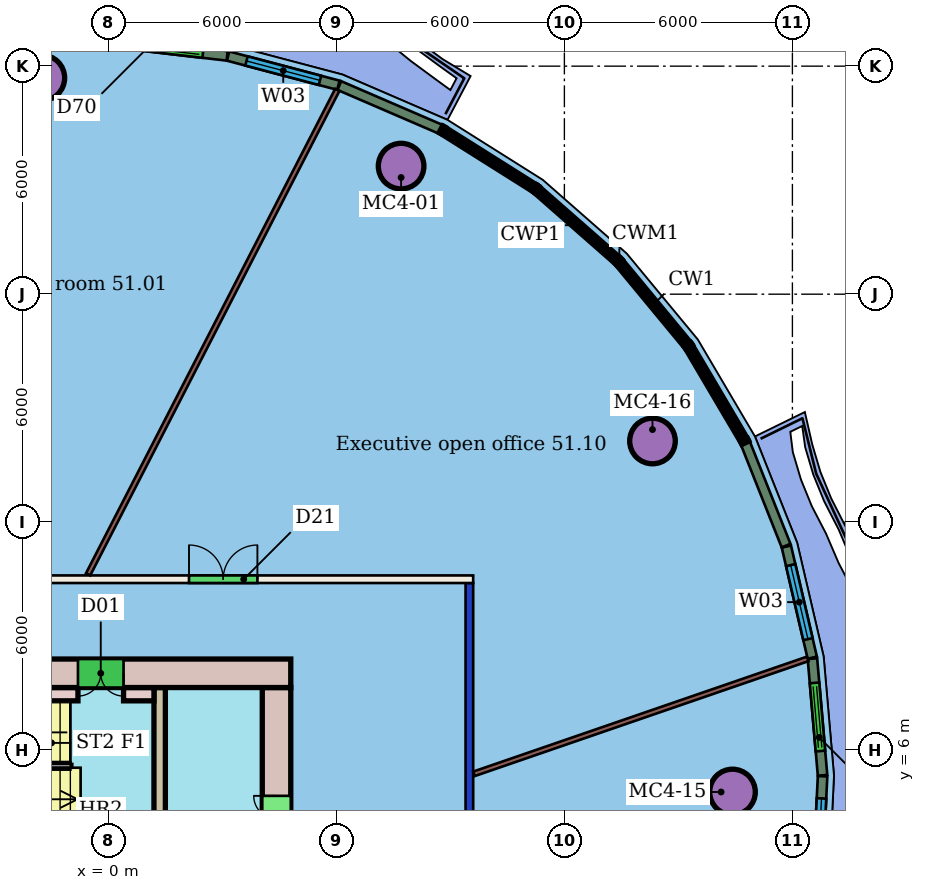
"""IFC4 building model, lengths in metres.
Left out: names, types, materials, properties, quantities, classifications, styles, units other than length and angle.
Written with IfcOpenShell. Run it as: python <this file> out.ifc"""

import sys

from ifc_helpers import new_model, si_unit, direction, frame, frame_2d, origin, origin_2d, place, context, subcontext, project, spatial, rectangle, hollow_circle, extrude, element, fill, save


model = new_model("IFC4")
c1 = context("Model", 3, precision=1e-05, world=origin(), true_north=direction((0.0, 1.0)))
c2 = subcontext(c1, "Body", "Model", "MODEL_VIEW")
j1 = project(units=[si_unit("LENGTHUNIT", "METRE"), si_unit("PLANEANGLEUNIT", "RADIAN")], contexts=[c1])
p1 = place(None, origin())
s1 = spatial("IfcSite", under=j1, at=p1, CompositionType="ELEMENT")
p2 = place(p1, origin())
s2 = spatial("IfcBuilding", under=s1, at=p2, CompositionType="ELEMENT")
p3 = place(p2, frame((0.0, 0.0, 210.1)))
s3 = spatial("IfcBuildingStorey", under=s2, at=p3, CompositionType="ELEMENT", Elevation=210.1)
for number, where, z_axis, x_axis in (
    (1, (7.704, 21.37, 0.0), (0.0, 0.0, 1.0), (1.0, 0.0, 0.0)),
    (2, (-1.75, 23.691, 0.0), (0.0, 0.0, 1.0), (1.0, 0.0, 0.0)),
    (3, (16.424, 4.901, 0.0), (0.0, 0.0, 1.0), (1.0, 0.0, 0.0)),
    (4, (14.318, 14.137, 0.0), (0.0, 0.0, 1.0), (1.0, 0.0, 0.0)),
):
    element("IfcColumn", number, at=place(p3, frame(where, z_axis=z_axis, x_axis=x_axis)), inside=s3, PredefinedType="COLUMN", context=c2, shape_type="SweptSolid", body=[
        extrude(hollow_circle(Radius=0.6, WallThickness=0.045, at=origin_2d()), origin(), (0.0, 0.0, 1.0), 3.45),
    ])
p4 = place(p3, frame((-21.6, 10.5, 0.0), z_axis=(0.0, 0.0, 1.0), x_axis=(1.0, 0.0, 0.0)))
e5 = element("IfcWall", 5, at=p4, inside=s3, PredefinedType="PARTITIONING", context=c2, shape_type="SweptSolid", body=[
    extrude(rectangle(XDim=31.2, YDim=0.2, at=frame_2d((15.6, 0.0))), origin(), (0.0, 0.0, 1.0), 3.45),
])
p5 = place(p4, frame((18.505, 0.0, 0.0)))
e6 = element("IfcOpeningElement", 6, at=p5, cuts=e5, PredefinedType="OPENING", context=c2, shape_type="SweptSolid", body=[
    extrude(rectangle(XDim=1.0, YDim=2.4, at=frame_2d((0.5, 1.2))), frame((0.0, 0.11, 0.0), z_axis=(0.0, -1.0, 0.0), x_axis=(1.0, 0.0, 0.0)), (0.0, 0.0, 1.0), 0.22),
])
p6 = place(p4, frame((11.808, 0.0, 0.0)))
e7 = element("IfcOpeningElement", 7, at=p6, cuts=e5, PredefinedType="OPENING", context=c2, shape_type="SweptSolid", body=[
    extrude(rectangle(XDim=1.0, YDim=2.4, at=frame_2d((0.5, 1.2))), frame((0.0, 0.11, 0.0), z_axis=(0.0, -1.0, 0.0), x_axis=(1.0, 0.0, 0.0)), (0.0, 0.0, 1.0), 0.22),
])
p7 = place(p4, frame((5.885, 0.0, 0.0)))
e8 = element("IfcOpeningElement", 8, at=p7, cuts=e5, PredefinedType="OPENING", context=c2, shape_type="SweptSolid", body=[
    extrude(rectangle(XDim=1.8, YDim=2.4, at=frame_2d((0.9, 1.2))), frame((0.0, 0.11, 0.0), z_axis=(0.0, -1.0, 0.0), x_axis=(1.0, 0.0, 0.0)), (0.0, 0.0, 1.0), 0.22),
])
p8 = place(p4, frame((23.722, 0.0, 0.0)))
e9 = element("IfcOpeningElement", 9, at=p8, cuts=e5, PredefinedType="OPENING", context=c2, shape_type="SweptSolid", body=[
    extrude(rectangle(XDim=1.8, YDim=2.1, at=frame_2d((0.9, 1.05))), frame((0.0, 0.11, 0.0), z_axis=(0.0, -1.0, 0.0), x_axis=(1.0, 0.0, 0.0)), (0.0, 0.0, 1.0), 0.22),
])
p9 = place(p3, frame((9.5, 10.4, 0.0), z_axis=(0.0, 0.0, 1.0), x_axis=(0.0, -1.0, 0.0)))
e10 = element("IfcWall", 10, at=p9, inside=s3, PredefinedType="PARTITIONING", context=c2, shape_type="SweptSolid", body=[
    extrude(rectangle(XDim=20.8, YDim=0.2, at=frame_2d((10.4, 0.0))), origin(), (0.0, 0.0, 1.0), 3.05),
])
p10 = place(p9, frame((11.307, 0.0, 0.0)))
e11 = element("IfcOpeningElement", 11, at=p10, cuts=e10, PredefinedType="OPENING", context=c2, shape_type="SweptSolid", body=[
    extrude(rectangle(XDim=1.5, YDim=2.1, at=frame_2d((0.75, 1.05))), frame((0.0, 0.11, 0.0), z_axis=(0.0, -1.0, 0.0), x_axis=(1.0, 0.0, 0.0)), (0.0, 0.0, 1.0), 0.22),
])
p11 = place(p3, frame((6.025, 23.377, 0.0), z_axis=(0.0, 0.0, 1.0), x_axis=(-0.457443054826, -0.889238917047, 0.0)))
e12 = element("IfcWall", 12, at=p11, inside=s3, PredefinedType="PARTITIONING", context=c2, shape_type="SweptSolid", body=[
    extrude(rectangle(XDim=14.336, YDim=0.125, at=frame_2d((7.168, 0.0))), origin(), (0.0, 0.0, 1.0), 3.45),
])
p12 = place(p3, frame((18.402, 8.403, 0.0), z_axis=(0.0, 0.0, 1.0), x_axis=(-0.945508934878, -0.325596151798, 0.0)))
e13 = element("IfcWall", 13, at=p12, inside=s3, PredefinedType="PARTITIONING", context=c2, shape_type="SweptSolid", body=[
    extrude(rectangle(XDim=9.288, YDim=0.125, at=frame_2d((4.644, 0.0))), origin(), (0.0, 0.0, 1.0), 3.45),
])
p13 = place(p3, frame((8.735, 22.343, 0.0), z_axis=(0.0, 0.0, 1.0), x_axis=(-0.918186540839, 0.396148300794, 0.0)))
e14 = element("IfcWall", 14, at=p13, inside=s3, PredefinedType="SOLIDWALL", context=c2, shape_type="SweptSolid", body=[
    extrude(rectangle(XDim=2.894, YDim=0.25, at=frame_2d((1.447, 0.0))), origin(), (0.0, 0.0, 1.0), 3.1),
])
p14 = place(p3, frame((6.053, 23.498, 0.0), z_axis=(0.0, 0.0, 1.0), x_axis=(-0.966837064295, 0.255393991914, 0.0)))
e15 = element("IfcWall", 15, at=p14, inside=s3, PredefinedType="SOLIDWALL", context=c2, shape_type="SweptSolid", body=[
    extrude(rectangle(XDim=3.002, YDim=0.25, at=frame_2d((1.501, 0.0))), origin(), (0.0, 0.0, 1.0), 3.1),
])
p15 = place(p14, frame((0.501, 0.0, 0.9)))
e16 = element("IfcOpeningElement", 16, at=p15, cuts=e15, PredefinedType="OPENING", context=c2, shape_type="SweptSolid", body=[
    extrude(rectangle(XDim=2.0, YDim=2.1, at=frame_2d((1.0, 1.05))), frame((0.0, 0.135, 0.0), z_axis=(0.0, -1.0, 0.0), x_axis=(1.0, 0.0, 0.0)), (0.0, 0.0, 1.0), 0.27),
])
p16 = place(p3, frame((3.125, 24.27, 0.0), z_axis=(0.0, 0.0, 1.0), x_axis=(-0.993285162652, 0.115691770042, 0.0)))
e17 = element("IfcWall", 17, at=p16, inside=s3, PredefinedType="SOLIDWALL", context=c2, shape_type="SweptSolid", body=[
    extrude(rectangle(XDim=3.081, YDim=0.25, at=frame_2d((1.541, 0.0))), origin(), (0.0, 0.0, 1.0), 3.1),
])
p17 = place(p16, frame((0.641, 0.0, 0.0)))
e18 = element("IfcOpeningElement", 18, at=p17, cuts=e17, PredefinedType="OPENING", context=c2, shape_type="SweptSolid", body=[
    extrude(rectangle(XDim=1.8, YDim=2.4, at=frame_2d((0.9, 1.2))), frame((0.0, 0.135, 0.0), z_axis=(0.0, -1.0, 0.0), x_axis=(1.0, 0.0, 0.0)), (0.0, 0.0, 1.0), 0.27),
])
p18 = place(p3, frame((18.64, 2.152, 0.0), z_axis=(0.0, 0.0, 1.0), x_axis=(0.048561254051, 0.998820206346, 0.0)))
e19 = element("IfcWall", 19, at=p18, inside=s3, PredefinedType="SOLIDWALL", context=c2, shape_type="SweptSolid", body=[
    extrude(rectangle(XDim=3.167, YDim=0.25, at=frame_2d((1.583, 0.0))), origin(), (0.0, 0.0, 1.0), 3.1),
])
p19 = place(p18, frame((0.584, 0.0, 0.9)))
e20 = element("IfcOpeningElement", 20, at=p19, cuts=e19, PredefinedType="OPENING", context=c2, shape_type="SweptSolid", body=[
    extrude(rectangle(XDim=2.0, YDim=2.1, at=frame_2d((1.0, 1.05))), frame((0.0, 0.135, 0.0), z_axis=(0.0, -1.0, 0.0), x_axis=(1.0, 0.0, 0.0)), (0.0, 0.0, 1.0), 0.27),
])
p20 = place(p3, frame((18.793, 5.341, 0.0), z_axis=(0.0, 0.0, 1.0), x_axis=(-0.086527038648, 0.996249502676, 0.0)))
e21 = element("IfcWall", 21, at=p20, inside=s3, PredefinedType="SOLIDWALL", context=c2, shape_type="SweptSolid", body=[
    extrude(rectangle(XDim=3.081, YDim=0.25, at=frame_2d((1.541, 0.0))), origin(), (0.0, 0.0, 1.0), 3.1),
])
p21 = place(p20, frame((0.641, 0.0, 0.0)))
e22 = element("IfcOpeningElement", 22, at=p21, cuts=e21, PredefinedType="OPENING", context=c2, shape_type="SweptSolid", body=[
    extrude(rectangle(XDim=1.8, YDim=2.4, at=frame_2d((0.9, 1.2))), frame((0.0, 0.135, 0.0), z_axis=(0.0, -1.0, 0.0), x_axis=(1.0, 0.0, 0.0)), (0.0, 0.0, 1.0), 0.27),
])
p22 = place(p3, frame((18.523, 8.436, 0.0), z_axis=(0.0, 0.0, 1.0), x_axis=(-0.226926203239, 0.973911956125, 0.0)))
e23 = element("IfcWall", 23, at=p22, inside=s3, PredefinedType="SOLIDWALL", context=c2, shape_type="SweptSolid", body=[
    extrude(rectangle(XDim=3.002, YDim=0.25, at=frame_2d((1.501, 0.0))), origin(), (0.0, 0.0, 1.0), 3.1),
])
p23 = place(p22, frame((0.501, 0.0, 0.9)))
e24 = element("IfcOpeningElement", 24, at=p23, cuts=e23, PredefinedType="OPENING", context=c2, shape_type="SweptSolid", body=[
    extrude(rectangle(XDim=2.0, YDim=2.1, at=frame_2d((1.0, 1.05))), frame((0.0, 0.135, 0.0), z_axis=(0.0, -1.0, 0.0), x_axis=(1.0, 0.0, 0.0)), (0.0, 0.0, 1.0), 0.27),
])
p24 = place(p3, frame((17.833, 11.384, 0.0), z_axis=(0.0, 0.0, 1.0), x_axis=(-0.369061887555, 0.929404821999, 0.0)))
e25 = element("IfcWall", 25, at=p24, inside=s3, PredefinedType="SOLIDWALL", context=c2, shape_type="SweptSolid", body=[
    extrude(rectangle(XDim=2.894, YDim=0.25, at=frame_2d((1.447, 0.0))), origin(), (0.0, 0.0, 1.0), 3.1),
])
p25 = place(p3, frame((4.8, 8.025, 0.0), z_axis=(0.0, 0.0, 1.0), x_axis=(-1.0, 0.0, 0.0)))
e26 = element("IfcWall", 26, at=p25, inside=s3, PredefinedType="SHEAR", context=c2, shape_type="SweptSolid", body=[
    extrude(rectangle(XDim=10.8, YDim=0.75, at=frame_2d((5.4, 0.0))), origin(), (0.0, 0.0, 1.0), 3.3),
])
p26 = place(p25, frame((4.4, 0.0, 0.0)))
e27 = element("IfcOpeningElement", 27, at=p26, cuts=e26, PredefinedType="OPENING", context=c2, shape_type="SweptSolid", body=[
    extrude(rectangle(XDim=1.2, YDim=2.1, at=frame_2d((0.6, 1.05))), frame((0.0, 0.385, 0.0), z_axis=(0.0, -1.0, 0.0), x_axis=(1.0, 0.0, 0.0)), (0.0, 0.0, 1.0), 0.77),
])
p27 = place(p3, frame((4.425, -7.65, 0.0), z_axis=(0.0, 0.0, 1.0), x_axis=(0.0, 1.0, 0.0)))
e28 = element("IfcWall", 28, at=p27, inside=s3, PredefinedType="SHEAR", context=c2, shape_type="SweptSolid", body=[
    extrude(rectangle(XDim=15.3, YDim=0.75, at=frame_2d((7.65, 0.0))), origin(), (0.0, 0.0, 1.0), 3.3),
])
p28 = place(p27, frame((2.85, 0.0, 0.0)))
e29 = element("IfcOpeningElement", 29, at=p28, cuts=e28, PredefinedType="OPENING", context=c2, shape_type="SweptSolid", body=[
    extrude(rectangle(XDim=1.2, YDim=2.1, at=frame_2d((0.6, 1.05))), frame((0.0, 0.385, 0.0), z_axis=(0.0, -1.0, 0.0), x_axis=(1.0, 0.0, 0.0)), (0.0, 0.0, 1.0), 0.77),
])
p29 = place(p27, frame((11.25, 0.0, 0.0)))
e30 = element("IfcOpeningElement", 30, at=p29, cuts=e28, PredefinedType="OPENING", context=c2, shape_type="SweptSolid", body=[
    extrude(rectangle(XDim=1.2, YDim=2.1, at=frame_2d((0.6, 1.05))), frame((0.0, 0.385, 0.0), z_axis=(0.0, -1.0, 0.0), x_axis=(1.0, 0.0, 0.0)), (0.0, 0.0, 1.0), 0.77),
])
p30 = place(p3, frame((1.35, -7.65, 0.0), z_axis=(0.0, 0.0, 1.0), x_axis=(0.0, 1.0, 0.0)))
e31 = element("IfcWall", 31, at=p30, inside=s3, PredefinedType="SHEAR", context=c2, shape_type="SweptSolid", body=[
    extrude(rectangle(XDim=15.3, YDim=0.3, at=frame_2d((7.65, 0.0))), origin(), (0.0, 0.0, 1.0), 3.3),
])
p31 = place(p30, frame((1.56, 0.0, 0.0)))
e32 = element("IfcOpeningElement", 32, at=p31, cuts=e31, PredefinedType="OPENING", context=c2, shape_type="SweptSolid", body=[
    extrude(rectangle(XDim=1.0, YDim=2.1, at=frame_2d((0.5, 1.05))), frame((0.0, 0.16, 0.0), z_axis=(0.0, -1.0, 0.0), x_axis=(1.0, 0.0, 0.0)), (0.0, 0.0, 1.0), 0.32),
])
p32 = place(p30, frame((6.9, 0.0, 0.0)))
e33 = element("IfcOpeningElement", 33, at=p32, cuts=e31, PredefinedType="OPENING", context=c2, shape_type="SweptSolid", body=[
    extrude(rectangle(XDim=1.5, YDim=2.1, at=frame_2d((0.75, 1.05))), frame((0.0, 0.16, 0.0), z_axis=(0.0, -1.0, 0.0), x_axis=(1.0, 0.0, 0.0)), (0.0, 0.0, 1.0), 0.32),
])
p33 = place(p3, frame((-5.85, 7.475, 0.0), z_axis=(0.0, 0.0, 1.0), x_axis=(1.0, 0.0, 0.0)))
e34 = element("IfcWall", 34, at=p33, inside=s3, PredefinedType="SHEAR", context=c2, shape_type="SweptSolid", body=[
    extrude(rectangle(XDim=5.05, YDim=0.35, at=frame_2d((2.525, 0.0))), origin(), (0.0, 0.0, 1.0), 3.3),
])
p34 = place(p3, frame((0.4, 7.475, 0.0), z_axis=(0.0, 0.0, 1.0), x_axis=(1.0, 0.0, 0.0)))
e35 = element("IfcWall", 35, at=p34, inside=s3, PredefinedType="SHEAR", context=c2, shape_type="SweptSolid", body=[
    extrude(rectangle(XDim=0.8, YDim=0.35, at=frame_2d((0.4, 0.0))), origin(), (0.0, 0.0, 1.0), 3.3),
])
p35 = place(p8, origin())
e36 = element("IfcDoor", 36, at=p35, inside=s3, OperationType="DOUBLE_DOOR_SINGLE_SWING", PredefinedType="DOOR", context=c2, shape_type="SweptSolid", body=[
    extrude(rectangle(XDim=1.8, YDim=2.1, at=frame_2d((0.9, 1.05))), frame((0.0, 0.025, 0.0), z_axis=(0.0, -1.0, 0.0), x_axis=(1.0, 0.0, 0.0)), (0.0, 0.0, 1.0), 0.05),
])
fill(e9, e36)
p36 = place(p15, origin())
e37 = element("IfcWindow", 37, at=p36, inside=s3, PartitioningType="SINGLE_PANEL", PredefinedType="WINDOW", context=c2, shape_type="SweptSolid", body=[
    extrude(rectangle(XDim=2.0, YDim=2.1, at=frame_2d((1.0, 1.05))), frame((0.0, 0.03, 0.0), z_axis=(0.0, -1.0, 0.0), x_axis=(1.0, 0.0, 0.0)), (0.0, 0.0, 1.0), 0.06),
])
fill(e16, e37)
p37 = place(p17, origin())
e38 = element("IfcDoor", 38, at=p37, inside=s3, OperationType="DOUBLE_DOOR_SLIDING", PredefinedType="DOOR", context=c2, shape_type="SweptSolid", body=[
    extrude(rectangle(XDim=1.8, YDim=2.4, at=frame_2d((0.9, 1.2))), frame((0.0, 0.025, 0.0), z_axis=(0.0, -1.0, 0.0), x_axis=(1.0, 0.0, 0.0)), (0.0, 0.0, 1.0), 0.05),
])
fill(e18, e38)
p38 = place(p19, origin())
e39 = element("IfcWindow", 39, at=p38, inside=s3, PartitioningType="SINGLE_PANEL", PredefinedType="WINDOW", context=c2, shape_type="SweptSolid", body=[
    extrude(rectangle(XDim=2.0, YDim=2.1, at=frame_2d((1.0, 1.05))), frame((0.0, 0.03, 0.0), z_axis=(0.0, -1.0, 0.0), x_axis=(1.0, 0.0, 0.0)), (0.0, 0.0, 1.0), 0.06),
])
fill(e20, e39)
p39 = place(p21, origin())
e40 = element("IfcDoor", 40, at=p39, inside=s3, OperationType="DOUBLE_DOOR_SLIDING", PredefinedType="DOOR", context=c2, shape_type="SweptSolid", body=[
    extrude(rectangle(XDim=1.8, YDim=2.4, at=frame_2d((0.9, 1.2))), frame((0.0, 0.025, 0.0), z_axis=(0.0, -1.0, 0.0), x_axis=(1.0, 0.0, 0.0)), (0.0, 0.0, 1.0), 0.05),
])
fill(e22, e40)
p40 = place(p23, origin())
e41 = element("IfcWindow", 41, at=p40, inside=s3, PartitioningType="SINGLE_PANEL", PredefinedType="WINDOW", context=c2, shape_type="SweptSolid", body=[
    extrude(rectangle(XDim=2.0, YDim=2.1, at=frame_2d((1.0, 1.05))), frame((0.0, 0.03, 0.0), z_axis=(0.0, -1.0, 0.0), x_axis=(1.0, 0.0, 0.0)), (0.0, 0.0, 1.0), 0.06),
])
fill(e24, e41)
p41 = place(p26, origin())
e42 = element("IfcDoor", 42, at=p41, inside=s3, OperationType="DOUBLE_DOOR_SINGLE_SWING", PredefinedType="NOTDEFINED", context=c2, shape_type="SweptSolid", body=[
    extrude(rectangle(XDim=1.2, YDim=2.1, at=frame_2d((0.6, 1.05))), frame((0.0, 0.025, 0.0), z_axis=(0.0, -1.0, 0.0), x_axis=(1.0, 0.0, 0.0)), (0.0, 0.0, 1.0), 0.05),
])
fill(e27, e42)
p42 = place(p29, origin())
e43 = element("IfcDoor", 43, at=p42, inside=s3, OperationType="DOUBLE_DOOR_SINGLE_SWING", PredefinedType="NOTDEFINED", context=c2, shape_type="SweptSolid", body=[
    extrude(rectangle(XDim=1.2, YDim=2.1, at=frame_2d((0.6, 1.05))), frame((0.0, 0.025, 0.0), z_axis=(0.0, -1.0, 0.0), x_axis=(1.0, 0.0, 0.0)), (0.0, 0.0, 1.0), 0.05),
])
fill(e30, e43)
save(model, sys.argv[1])
